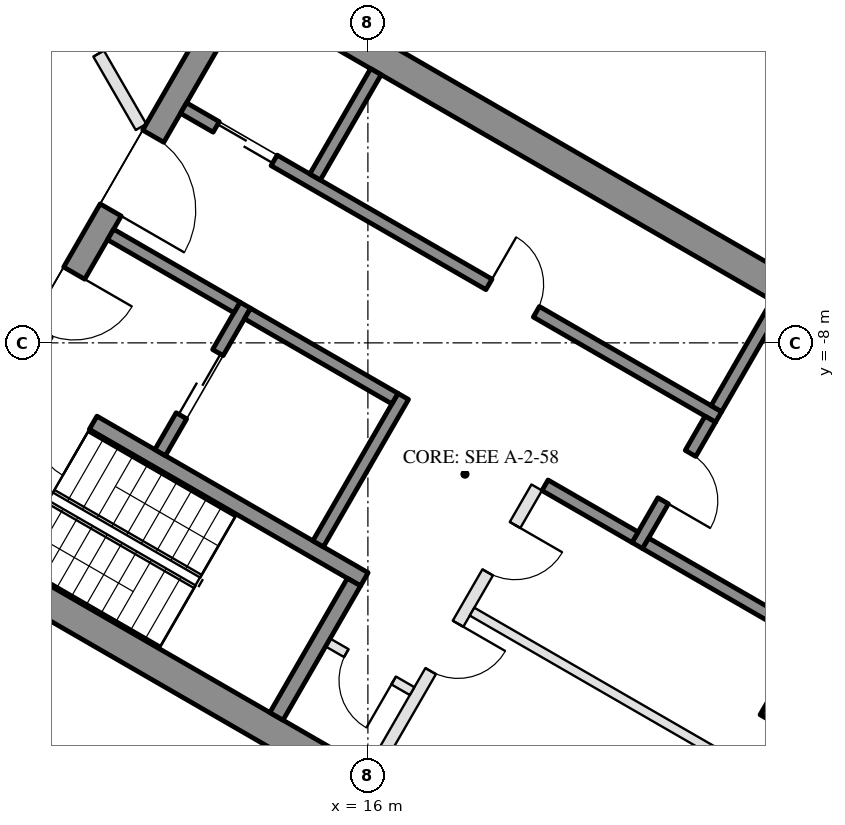
"""IFC4 building model, lengths in metres.
Left out: names, types, materials, properties, quantities, classifications, styles, units other than length and angle.
Written with IfcOpenShell. Run it as: python <this file> out.ifc"""

import sys

from ifc_helpers import new_model, si_unit, direction, frame, frame_2d, origin, origin_2d, place, context, subcontext, project, spatial, rectangle, hollow_rectangle, extrude, boolean, halfspace, element, fill, save


model = new_model("IFC4")
c1 = context("Model", 3, precision=1e-05, world=origin(), true_north=direction((0.0, 1.0)))
c2 = subcontext(c1, "Body", "Model", "MODEL_VIEW")
j1 = project(units=[si_unit("LENGTHUNIT", "METRE"), si_unit("PLANEANGLEUNIT", "RADIAN")], contexts=[c1])
p1 = place(None, origin())
s1 = spatial("IfcSite", under=j1, at=p1, CompositionType="ELEMENT")
p2 = place(p1, origin())
s2 = spatial("IfcBuilding", under=s1, at=p2, CompositionType="ELEMENT")
p3 = place(p2, frame((0.0, 0.0, 250.4)))
s3 = spatial("IfcBuildingStorey", under=s2, at=p3, CompositionType="ELEMENT", Elevation=250.4)
p4 = place(p3, frame((23.816, -13.75, 0.0), z_axis=(0.0, 0.0, 1.0), x_axis=(0.5, 0.866025403784, 0.0)))
e1 = element("IfcColumn", 1, at=p4, inside=s3, PredefinedType="COLUMN", context=c2, shape_type="SweptSolid", body=[
    boolean("DIFFERENCE", extrude(hollow_rectangle(XDim=2.0, YDim=2.0, WallThickness=0.05, at=origin_2d()), origin(), (0.0, 0.0, 1.0), 3.7), halfspace(frame((0.0, 0.0, 3.588), z_axis=(0.0, 0.0, 1.0), x_axis=(1.0, 0.0, 0.0)), False)),
])
p5 = place(p3, frame((26.257, -6.567, 0.0), z_axis=(0.0, 0.0, 1.0), x_axis=(-0.500023526245, 0.866011820475, 0.0)))
e2 = element("IfcWall", 2, at=p5, inside=s3, PredefinedType="SOLIDWALL", context=c2, shape_type="SweptSolid", body=[
    extrude(rectangle(XDim=11.816, YDim=0.35, at=frame_2d((5.908, 0.0))), origin(), (0.0, 0.0, 1.0), 3.55),
])
p6 = place(p5, frame((0.38, 0.0, 0.3)))
e3 = element("IfcOpeningElement", 3, at=p6, cuts=e2, PredefinedType="OPENING", context=c2, shape_type="SweptSolid", body=[
    extrude(rectangle(XDim=1.9, YDim=2.65, at=frame_2d((0.95, 1.325))), frame((0.0, 0.185, 0.0), z_axis=(0.0, -1.0, 0.0), x_axis=(1.0, 0.0, 0.0)), (0.0, 0.0, 1.0), 0.37),
])
p7 = place(p5, frame((7.841, 0.0, 0.0)))
e4 = element("IfcOpeningElement", 4, at=p7, cuts=e2, PredefinedType="OPENING", context=c2, shape_type="SweptSolid", body=[
    extrude(rectangle(XDim=2.4, YDim=2.4, at=frame_2d((1.2, 1.2))), frame((0.0, 0.185, 0.0), z_axis=(0.0, -1.0, 0.0), x_axis=(1.0, 0.0, 0.0)), (0.0, 0.0, 1.0), 0.37),
])
p8 = place(p5, frame((3.691, 0.0, 0.3)))
e5 = element("IfcOpeningElement", 5, at=p8, cuts=e2, PredefinedType="OPENING", context=c2, shape_type="SweptSolid", body=[
    extrude(rectangle(XDim=1.7, YDim=2.65, at=frame_2d((0.85, 1.325))), frame((0.0, 0.185, 0.0), z_axis=(0.0, -1.0, 0.0), x_axis=(1.0, 0.0, 0.0)), (0.0, 0.0, 1.0), 0.37),
])
p9 = place(p5, frame((5.691, 0.0, 0.3)))
e6 = element("IfcOpeningElement", 6, at=p9, cuts=e2, PredefinedType="OPENING", context=c2, shape_type="SweptSolid", body=[
    extrude(rectangle(XDim=1.7, YDim=2.65, at=frame_2d((0.85, 1.325))), frame((0.0, 0.185, 0.0), z_axis=(0.0, -1.0, 0.0), x_axis=(1.0, 0.0, 0.0)), (0.0, 0.0, 1.0), 0.37),
])
for number, where, z_axis, x_axis in (
    (7, (8.547, -10.997, 0.0), (0.0, 0.0, 1.0), (0.866, -0.5, 0.0)),
    (8, (13.797, -1.903, 0.0), (0.0, 0.0, 1.0), (0.866, -0.5, 0.0)),
):
    element("IfcWall", number, at=place(p3, frame(where, z_axis=z_axis, x_axis=x_axis)), inside=s3, PredefinedType="SHEAR", context=c2, shape_type="SweptSolid", body=[
        extrude(rectangle(XDim=14.837, YDim=0.5, at=frame_2d((7.418, 0.0))), origin(), (0.0, 0.0, 1.0), 3.5),
    ])
p10 = place(p3, frame((8.845, -10.88, 0.0), z_axis=(0.0, 0.0, 1.0), x_axis=(0.500004234368, 0.866022959057, 0.0)))
e9 = element("IfcWall", 9, at=p10, inside=s3, PredefinedType="SHEAR", context=c2, shape_type="SweptSolid", body=[
    extrude(rectangle(XDim=10.0, YDim=0.4, at=frame_2d((5.0, 0.0))), origin(), (0.0, 0.0, 1.0), 3.5),
])
p11 = place(p10, frame((3.55, 0.0, 0.0)))
e10 = element("IfcOpeningElement", 10, at=p11, cuts=e9, PredefinedType="OPENING", context=c2, shape_type="SweptSolid", body=[
    extrude(rectangle(XDim=1.1, YDim=2.1, at=frame_2d((0.55, 1.05))), frame((0.0, 0.21, 0.0), z_axis=(0.0, -1.0, 0.0), x_axis=(1.0, 0.0, 0.0)), (0.0, 0.0, 1.0), 0.42),
])
p12 = place(p10, frame((5.85, 0.0, 0.0)))
e11 = element("IfcOpeningElement", 11, at=p12, cuts=e9, PredefinedType="OPENING", context=c2, shape_type="SweptSolid", body=[
    extrude(rectangle(XDim=1.4, YDim=2.1, at=frame_2d((0.7, 1.05))), frame((0.0, 0.21, 0.0), z_axis=(0.0, -1.0, 0.0), x_axis=(1.0, 0.0, 0.0)), (0.0, 0.0, 1.0), 0.42),
])
p13 = place(p3, frame((10.356, -8.664, 0.0), z_axis=(0.0, 0.0, 1.0), x_axis=(0.866028629588, -0.499994412703, 0.0)))
e12 = element("IfcWall", 12, at=p13, inside=s3, PredefinedType="SHEAR", context=c2, shape_type="SweptSolid", body=[
    extrude(rectangle(XDim=6.45, YDim=0.25, at=frame_2d((3.225, 0.0))), origin(), (0.0, 0.0, 1.0), 3.5),
])
p14 = place(p13, frame((0.3, 0.0, 0.0)))
e13 = element("IfcOpeningElement", 13, at=p14, cuts=e12, PredefinedType="OPENING", context=c2, shape_type="SweptSolid", body=[
    extrude(rectangle(XDim=1.0, YDim=2.1, at=frame_2d((0.5, 1.05))), frame((0.0, 0.135, 0.0), z_axis=(0.0, -1.0, 0.0), x_axis=(1.0, 0.0, 0.0)), (0.0, 0.0, 1.0), 0.27),
])
p15 = place(p3, frame((14.496, -14.143, 0.0), z_axis=(0.0, 0.0, 1.0), x_axis=(0.500062241894, 0.865989465428, 0.0)))
e14 = element("IfcWall", 14, at=p15, inside=s3, PredefinedType="SHEAR", context=c2, shape_type="SweptSolid", body=[
    extrude(rectangle(XDim=2.55, YDim=0.25, at=frame_2d((1.275, 0.0))), origin(), (0.0, 0.0, 1.0), 3.5),
])
p16 = place(p3, frame((15.181, -11.305, 0.0), z_axis=(0.0, 0.0, 1.0), x_axis=(0.49994636267, 0.866056369097, 0.0)))
e15 = element("IfcWall", 15, at=p16, inside=s3, PredefinedType="SHEAR", context=c2, shape_type="SweptSolid", body=[
    extrude(rectangle(XDim=2.8, YDim=0.2, at=frame_2d((1.4, 0.0))), origin(), (0.0, 0.0, 1.0), 3.5),
])
p17 = place(p3, frame((12.583, -9.805, 0.0), z_axis=(0.0, 0.0, 1.0), x_axis=(0.49994636267, 0.866056369097, 0.0)))
e16 = element("IfcWall", 16, at=p17, inside=s3, PredefinedType="SHEAR", context=c2, shape_type="SweptSolid", body=[
    extrude(rectangle(XDim=2.8, YDim=0.2, at=frame_2d((1.4, 0.0))), origin(), (0.0, 0.0, 1.0), 3.5),
])
p18 = place(p17, frame((0.7, 0.0, 0.0)))
e17 = element("IfcOpeningElement", 17, at=p18, cuts=e16, PredefinedType="OPENING", context=c2, shape_type="SweptSolid", body=[
    extrude(rectangle(XDim=1.2, YDim=2.1, at=frame_2d((0.6, 1.05))), frame((0.0, 0.11, 0.0), z_axis=(0.0, -1.0, 0.0), x_axis=(1.0, 0.0, 0.0)), (0.0, 0.0, 1.0), 0.22),
])
p19 = place(p3, frame((11.768, -6.217, 0.0), z_axis=(0.0, 0.0, 1.0), x_axis=(0.866050077142, -0.499957262057, 0.0)))
e18 = element("IfcWall", 18, at=p19, inside=s3, PredefinedType="SHEAR", context=c2, shape_type="SweptSolid", body=[
    extrude(rectangle(XDim=2.4, YDim=0.2, at=frame_2d((1.2, 0.0))), origin(), (0.0, 0.0, 1.0), 3.5),
])
p20 = place(p3, frame((14.02, -7.517, 0.0), z_axis=(0.0, 0.0, 1.0), x_axis=(0.866034573852, -0.49998411664, 0.0)))
e19 = element("IfcWall", 19, at=p20, inside=s3, PredefinedType="SHEAR", context=c2, shape_type="SweptSolid", body=[
    extrude(rectangle(XDim=2.8, YDim=0.2, at=frame_2d((1.4, 0.0))), origin(), (0.0, 0.0, 1.0), 3.5),
])
p21 = place(p3, frame((12.968, -4.138, 0.0), z_axis=(0.0, 0.0, 1.0), x_axis=(0.866028328073, -0.49999493495, 0.0)))
e20 = element("IfcWall", 20, at=p21, inside=s3, PredefinedType="SHEAR", context=c2, shape_type="SweptSolid", body=[
    extrude(rectangle(XDim=10.16, YDim=0.2, at=frame_2d((5.08, 0.0))), origin(), (0.0, 0.0, 1.0), 3.5),
])
p22 = place(p21, frame((0.62, 0.0, 0.0)))
e21 = element("IfcOpeningElement", 21, at=p22, cuts=e20, PredefinedType="OPENING", context=c2, shape_type="SweptSolid", body=[
    extrude(rectangle(XDim=1.1, YDim=2.1, at=frame_2d((0.55, 1.05))), frame((0.0, 0.11, 0.0), z_axis=(0.0, -1.0, 0.0), x_axis=(1.0, 0.0, 0.0)), (0.0, 0.0, 1.0), 0.22),
])
p23 = place(p21, frame((5.8, 0.0, 0.0)))
e22 = element("IfcOpeningElement", 22, at=p23, cuts=e20, PredefinedType="OPENING", context=c2, shape_type="SweptSolid", body=[
    extrude(rectangle(XDim=0.9, YDim=2.1, at=frame_2d((0.45, 1.05))), frame((0.0, 0.11, 0.0), z_axis=(0.0, -1.0, 0.0), x_axis=(1.0, 0.0, 0.0)), (0.0, 0.0, 1.0), 0.22),
])
p24 = place(p3, frame((20.43, -11.333, 0.0), z_axis=(0.0, 0.0, 1.0), x_axis=(0.500001309137, 0.866024647952, 0.0)))
e23 = element("IfcWall", 23, at=p24, inside=s3, PredefinedType="SHEAR", context=c2, shape_type="SweptSolid", body=[
    extrude(rectangle(XDim=2.4, YDim=0.2, at=frame_2d((1.2, 0.0))), origin(), (0.0, 0.0, 1.0), 3.5),
])
p25 = place(p24, frame((0.85, 0.0, 0.0)))
e24 = element("IfcOpeningElement", 24, at=p25, cuts=e23, PredefinedType="OPENING", context=c2, shape_type="SweptSolid", body=[
    extrude(rectangle(XDim=0.9, YDim=2.1, at=frame_2d((0.45, 1.05))), frame((0.0, 0.11, 0.0), z_axis=(0.0, -1.0, 0.0), x_axis=(1.0, 0.0, 0.0)), (0.0, 0.0, 1.0), 0.22),
])
p26 = place(p3, frame((18.913, -10.342, 0.0), z_axis=(0.0, 0.0, 1.0), x_axis=(0.866038183914, -0.499977863513, 0.0)))
e25 = element("IfcWall", 25, at=p26, inside=s3, PredefinedType="SHEAR", context=c2, shape_type="SweptSolid", body=[
    extrude(rectangle(XDim=1.71, YDim=0.2, at=frame_2d((0.855, 0.0))), origin(), (0.0, 0.0, 1.0), 3.5),
])
for number, where, z_axis, x_axis in (
    (26, (15.131, -5.272, 0.0), (0.0, 0.0, 1.0), (0.5, 0.866, 0.0)),
    (27, (21.73, -9.082, 0.0), (0.0, 0.0, 1.0), (0.5, 0.866, 0.0)),
):
    element("IfcWall", number, at=place(p3, frame(where, z_axis=z_axis, x_axis=x_axis)), inside=s3, PredefinedType="SHEAR", context=c2, shape_type="SweptSolid", body=[
        extrude(rectangle(XDim=2.0, YDim=0.2, at=frame_2d((1.0, 0.0))), origin(), (0.0, 0.0, 1.0), 3.5),
    ])
p27 = place(p3, frame((20.567, -11.297, 0.0), z_axis=(0.0, 0.0, 1.0), x_axis=(0.866065229334, -0.49993101378, 0.0)))
e28 = element("IfcWall", 28, at=p27, inside=s3, PredefinedType="SHEAR", context=c2, shape_type="SweptSolid", body=[
    extrude(rectangle(XDim=3.04, YDim=0.2, at=frame_2d((1.52, 0.0))), origin(), (0.0, 0.0, 1.0), 3.5),
])
p28 = place(p3, frame((16.076, -15.055, 0.0), z_axis=(0.0, 0.0, 1.0), x_axis=(0.499995103361, 0.866028230842, 0.0)))
e29 = element("IfcWall", 29, at=p28, inside=s3, PredefinedType="PARTITIONING", context=c2, shape_type="SweptSolid", body=[
    extrude(rectangle(XDim=5.4, YDim=0.2, at=frame_2d((2.7, 0.0))), origin(), (0.0, 0.0, 1.0), 3.5),
])
p29 = place(p28, frame((1.913, 0.0, 0.0)))
e30 = element("IfcOpeningElement", 30, at=p29, cuts=e29, PredefinedType="OPENING", context=c2, shape_type="SweptSolid", body=[
    extrude(rectangle(XDim=0.9, YDim=2.1, at=frame_2d((0.45, 1.05))), frame((0.0, 0.11, 0.0), z_axis=(0.0, -1.0, 0.0), x_axis=(1.0, 0.0, 0.0)), (0.0, 0.0, 1.0), 0.22),
])
p30 = place(p28, frame((3.788, 0.0, 0.0)))
e31 = element("IfcOpeningElement", 31, at=p30, cuts=e29, PredefinedType="OPENING", context=c2, shape_type="SweptSolid", body=[
    extrude(rectangle(XDim=0.9, YDim=2.1, at=frame_2d((0.45, 1.05))), frame((0.0, 0.11, 0.0), z_axis=(0.0, -1.0, 0.0), x_axis=(1.0, 0.0, 0.0)), (0.0, 0.0, 1.0), 0.22),
])
p31 = place(p3, frame((15.342, -12.928, 0.0), z_axis=(0.0, 0.0, 1.0), x_axis=(0.865989903783, -0.500061482766, 0.0)))
e32 = element("IfcWall", 32, at=p31, inside=s3, PredefinedType="PARTITIONING", context=c2, shape_type="SweptSolid", body=[
    extrude(rectangle(XDim=1.6, YDim=0.15, at=frame_2d((0.8, 0.0))), origin(), (0.0, 0.0, 1.0), 3.5),
])
p32 = place(p31, frame((0.35, 0.0, 0.0)))
e33 = element("IfcOpeningElement", 33, at=p32, cuts=e32, PredefinedType="OPENING", context=c2, shape_type="SweptSolid", body=[
    extrude(rectangle(XDim=0.9, YDim=2.1, at=frame_2d((0.45, 1.05))), frame((0.0, 0.085, 0.0), z_axis=(0.0, -1.0, 0.0), x_axis=(1.0, 0.0, 0.0)), (0.0, 0.0, 1.0), 0.17),
])
p33 = place(p3, frame((17.713, -12.42, 0.0), z_axis=(0.0, 0.0, 1.0), x_axis=(0.866016523273, -0.500015381182, 0.0)))
e34 = element("IfcWall", 34, at=p33, inside=s3, PredefinedType="PARTITIONING", context=c2, shape_type="SweptSolid", body=[
    extrude(rectangle(XDim=6.95, YDim=0.15, at=frame_2d((3.475, 0.0))), origin(), (0.0, 0.0, 1.0), 3.5),
])
p34 = place(p3, frame((10.375, -1.169, 0.0), z_axis=(0.0, 0.0, 1.0), x_axis=(0.500055316652, -0.865993464345, 0.0)))
e35 = element("IfcWall", 35, at=p34, inside=s3, PredefinedType="PARTITIONING", context=c2, shape_type="SweptSolid", body=[
    extrude(rectangle(XDim=3.788, YDim=0.2, at=frame_2d((1.894, 0.0))), origin(), (0.0, 0.0, 1.0), 2.95),
])
p35 = place(p34, frame((1.394, 0.0, 0.0)))
e36 = element("IfcOpeningElement", 36, at=p35, cuts=e35, PredefinedType="OPENING", context=c2, shape_type="SweptSolid", body=[
    extrude(rectangle(XDim=1.0, YDim=2.1, at=frame_2d((0.5, 1.05))), frame((0.0, 0.11, 0.0), z_axis=(0.0, -1.0, 0.0), x_axis=(1.0, 0.0, 0.0)), (0.0, 0.0, 1.0), 0.22),
])
p36 = place(p18, origin())
e37 = element("IfcDoor", 37, at=p36, inside=s3, OperationType="DOUBLE_DOOR_SLIDING", PredefinedType="DOOR", context=c2, shape_type="SweptSolid", body=[
    extrude(rectangle(XDim=1.2, YDim=2.1, at=frame_2d((0.6, 1.05))), frame((0.0, 0.025, 0.0), z_axis=(0.0, -1.0, 0.0), x_axis=(1.0, 0.0, 0.0)), (0.0, 0.0, 1.0), 0.05),
])
fill(e17, e37)
p37 = place(p32, frame((0.9, 0.0, 0.0), z_axis=(0.0, 0.0, 1.0), x_axis=(-1.0, 0.0, 0.0)))
e38 = element("IfcDoor", 38, at=p37, inside=s3, OperationType="SINGLE_SWING_LEFT", PredefinedType="DOOR", context=c2, shape_type="SweptSolid", body=[
    extrude(rectangle(XDim=0.9, YDim=2.1, at=frame_2d((0.45, 1.05))), frame((0.0, 0.025, 0.0), z_axis=(0.0, -1.0, 0.0), x_axis=(1.0, 0.0, 0.0)), (0.0, 0.0, 1.0), 0.05),
])
fill(e33, e38)
p38 = place(p22, origin())
e39 = element("IfcDoor", 39, at=p38, inside=s3, OperationType="DOUBLE_DOOR_SLIDING", PredefinedType="DOOR", context=c2, shape_type="SweptSolid", body=[
    extrude(rectangle(XDim=1.1, YDim=2.1, at=frame_2d((0.55, 1.05))), frame((0.0, 0.025, 0.0), z_axis=(0.0, -1.0, 0.0), x_axis=(1.0, 0.0, 0.0)), (0.0, 0.0, 1.0), 0.05),
])
fill(e21, e39)
p39 = place(p23, origin())
e40 = element("IfcDoor", 40, at=p39, inside=s3, OperationType="SINGLE_SWING_LEFT", PredefinedType="DOOR", context=c2, shape_type="SweptSolid", body=[
    extrude(rectangle(XDim=0.9, YDim=2.1, at=frame_2d((0.45, 1.05))), frame((0.0, 0.025, 0.0), z_axis=(0.0, -1.0, 0.0), x_axis=(1.0, 0.0, 0.0)), (0.0, 0.0, 1.0), 0.05),
])
fill(e22, e40)
p40 = place(p25, frame((0.9, 0.0, 0.0), z_axis=(0.0, 0.0, 1.0), x_axis=(-1.0, 0.0, 0.0)))
e41 = element("IfcDoor", 41, at=p40, inside=s3, OperationType="SINGLE_SWING_RIGHT", PredefinedType="DOOR", context=c2, shape_type="SweptSolid", body=[
    extrude(rectangle(XDim=0.9, YDim=2.1, at=frame_2d((0.45, 1.05))), frame((0.0, 0.025, 0.0), z_axis=(0.0, -1.0, 0.0), x_axis=(1.0, 0.0, 0.0)), (0.0, 0.0, 1.0), 0.05),
])
fill(e24, e41)
p41 = place(p29, frame((0.9, 0.0, 0.0), z_axis=(0.0, 0.0, 1.0), x_axis=(-1.0, 0.0, 0.0)))
e42 = element("IfcDoor", 42, at=p41, inside=s3, OperationType="SINGLE_SWING_LEFT", PredefinedType="DOOR", context=c2, shape_type="SweptSolid", body=[
    extrude(rectangle(XDim=0.9, YDim=2.1, at=frame_2d((0.45, 1.05))), frame((0.0, 0.025, 0.0), z_axis=(0.0, -1.0, 0.0), x_axis=(1.0, 0.0, 0.0)), (0.0, 0.0, 1.0), 0.05),
])
fill(e30, e42)
p42 = place(p30, frame((0.9, 0.0, 0.0), z_axis=(0.0, 0.0, 1.0), x_axis=(-1.0, 0.0, 0.0)))
e43 = element("IfcDoor", 43, at=p42, inside=s3, OperationType="SINGLE_SWING_LEFT", PredefinedType="DOOR", context=c2, shape_type="SweptSolid", body=[
    extrude(rectangle(XDim=0.9, YDim=2.1, at=frame_2d((0.45, 1.05))), frame((0.0, 0.025, 0.0), z_axis=(0.0, -1.0, 0.0), x_axis=(1.0, 0.0, 0.0)), (0.0, 0.0, 1.0), 0.05),
])
fill(e31, e43)
p43 = place(p11, frame((1.1, 0.0, 0.0), z_axis=(0.0, 0.0, 1.0), x_axis=(-1.0, 0.0, 0.0)))
e44 = element("IfcDoor", 44, at=p43, inside=s3, OperationType="SINGLE_SWING_LEFT", PredefinedType="DOOR", context=c2, shape_type="SweptSolid", body=[
    extrude(rectangle(XDim=1.1, YDim=2.1, at=frame_2d((0.55, 1.05))), frame((0.0, 0.025, 0.0), z_axis=(0.0, -1.0, 0.0), x_axis=(1.0, 0.0, 0.0)), (0.0, 0.0, 1.0), 0.05),
])
fill(e10, e44)
p44 = place(p12, frame((1.4, 0.0, 0.0), z_axis=(0.0, 0.0, 1.0), x_axis=(-1.0, 0.0, 0.0)))
e45 = element("IfcDoor", 45, at=p44, inside=s3, OperationType="DOUBLE_DOOR_SINGLE_SWING", PredefinedType="DOOR", context=c2, shape_type="SweptSolid", body=[
    extrude(rectangle(XDim=1.4, YDim=2.1, at=frame_2d((0.7, 1.05))), frame((0.0, 0.025, 0.0), z_axis=(0.0, -1.0, 0.0), x_axis=(1.0, 0.0, 0.0)), (0.0, 0.0, 1.0), 0.05),
])
fill(e11, e45)
p45 = place(p14, frame((1.0, 0.0, 0.0), z_axis=(0.0, 0.0, 1.0), x_axis=(-1.0, 0.0, 0.0)))
e46 = element("IfcDoor", 46, at=p45, inside=s3, OperationType="SINGLE_SWING_LEFT", PredefinedType="DOOR", context=c2, shape_type="SweptSolid", body=[
    extrude(rectangle(XDim=1.0, YDim=2.1, at=frame_2d((0.5, 1.05))), frame((0.0, 0.025, 0.0), z_axis=(0.0, -1.0, 0.0), x_axis=(1.0, 0.0, 0.0)), (0.0, 0.0, 1.0), 0.05),
])
fill(e13, e46)
p46 = place(p35, origin())
e47 = element("IfcDoor", 47, at=p46, inside=s3, OperationType="SINGLE_SWING_LEFT", PredefinedType="DOOR", context=c2, shape_type="SweptSolid", body=[
    extrude(rectangle(XDim=1.0, YDim=2.1, at=frame_2d((0.5, 1.05))), frame((0.0, 0.025, 0.0), z_axis=(0.0, -1.0, 0.0), x_axis=(1.0, 0.0, 0.0)), (0.0, 0.0, 1.0), 0.05),
])
fill(e36, e47)
save(model, sys.argv[1])
